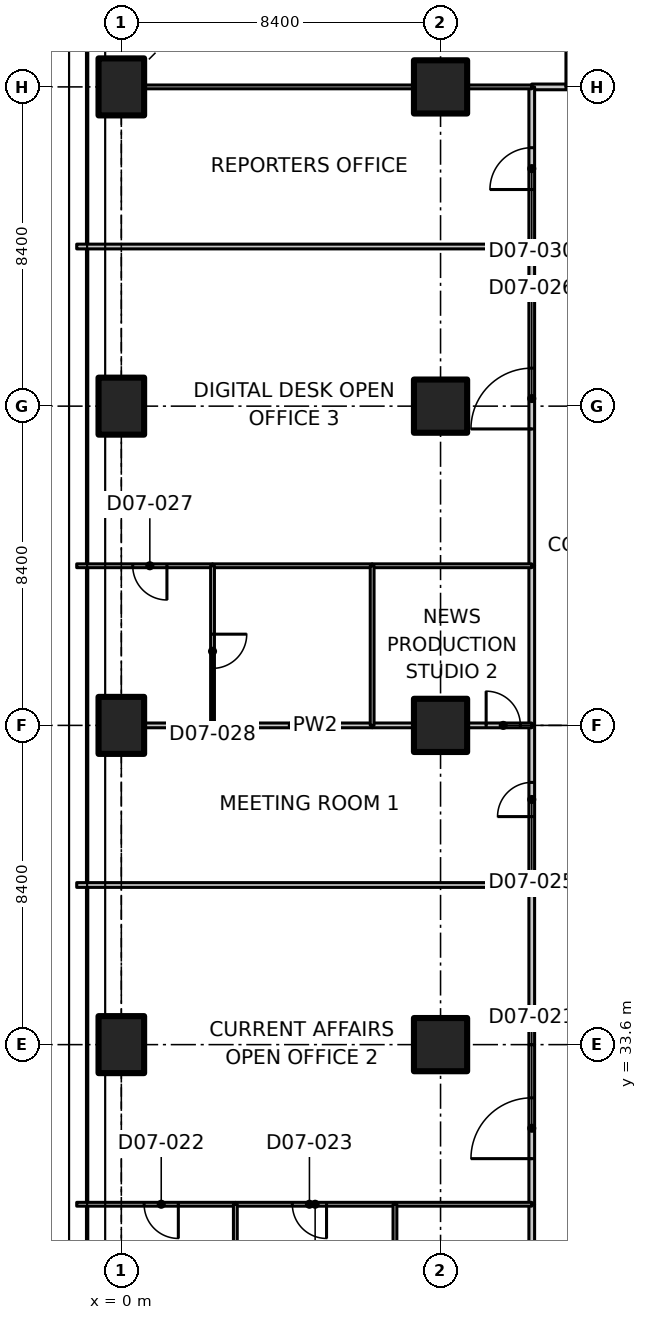
"""IFC4 building model, lengths in metres.
Left out: names, types, materials, properties, quantities, classifications, styles, units other than length and angle.
Written with IfcOpenShell. Run it as: python <this file> out.ifc"""

import sys

from ifc_helpers import new_model, si_unit, direction, frame, frame_2d, origin, origin_2d, place, context, subcontext, project, spatial, polyline, rectangle, outline, extrude, element, fill, save


model = new_model("IFC4")
c1 = context("Model", 3, precision=1e-05, world=origin(), true_north=direction((0.0, 1.0)))
c2 = subcontext(c1, "Body", "Model", "MODEL_VIEW")
j1 = project(units=[si_unit("LENGTHUNIT", "METRE"), si_unit("PLANEANGLEUNIT", "RADIAN")], contexts=[c1])
p1 = place(None, origin())
s1 = spatial("IfcSite", under=j1, at=p1, CompositionType="ELEMENT")
p2 = place(p1, origin())
s2 = spatial("IfcBuilding", under=s1, at=p2, CompositionType="ELEMENT")
p3 = place(p2, frame((0.0, 0.0, 43.7)))
s3 = spatial("IfcBuildingStorey", under=s2, at=p3, CompositionType="ELEMENT", Elevation=43.7)
for number, where, z_axis, x_axis in (
    (1, (0.0, 33.6, 0.0), (0.0, 0.0, 1.0), (1.0, 0.0, 0.0)),
    (2, (0.0, 42.0, 0.0), (0.0, 0.0, 1.0), (1.0, 0.0, 0.0)),
    (3, (0.0, 50.4, 0.0), (0.0, 0.0, 1.0), (1.0, 0.0, 0.0)),
    (4, (0.0, 58.8, 0.0), (0.0, 0.0, 1.0), (1.0, 0.0, 0.0)),
):
    element("IfcColumn", number, at=place(p3, frame(where, z_axis=z_axis, x_axis=x_axis)), inside=s3, PredefinedType="COLUMN", context=c2, shape_type="SweptSolid", body=[
        extrude(rectangle(XDim=1.2, YDim=1.5, at=origin_2d()), origin(), (0.0, 0.0, 1.0), 3.35),
    ])
for number, where, z_axis, x_axis in (
    (5, (8.4, 33.6, 0.0), (0.0, 0.0, 1.0), (1.0, 0.0, 0.0)),
    (6, (8.4, 42.0, 0.0), (0.0, 0.0, 1.0), (1.0, 0.0, 0.0)),
    (7, (8.4, 50.4, 0.0), (0.0, 0.0, 1.0), (1.0, 0.0, 0.0)),
    (8, (8.4, 58.8, 0.0), (0.0, 0.0, 1.0), (1.0, 0.0, 0.0)),
):
    element("IfcColumn", number, at=place(p3, frame(where, z_axis=z_axis, x_axis=x_axis)), inside=s3, PredefinedType="COLUMN", context=c2, shape_type="SweptSolid", body=[
        extrude(rectangle(XDim=1.4, YDim=1.4, at=origin_2d()), origin(), (0.0, 0.0, 1.0), 3.35),
    ])
p4 = place(p3, frame((10.8, 29.4, 0.0), z_axis=(0.0, 0.0, 1.0), x_axis=(0.0, 1.0, 0.0)))
e9 = element("IfcWall", 9, at=p4, inside=s3, PredefinedType="PARTITIONING", context=c2, shape_type="SweptSolid", body=[
    extrude(rectangle(XDim=4.2, YDim=0.15, at=frame_2d((2.1, 0.0))), origin(), (0.0, 0.0, 1.0), 3.33),
])
p5 = place(p4, frame((1.2, 0.0, 0.0)))
e10 = element("IfcOpeningElement", 10, at=p5, cuts=e9, PredefinedType="OPENING", context=c2, shape_type="SweptSolid", body=[
    extrude(rectangle(XDim=1.6, YDim=2.1, at=frame_2d((0.8, 1.05))), frame((0.0, 0.085, 0.0), z_axis=(0.0, -1.0, 0.0), x_axis=(1.0, 0.0, 0.0)), (0.0, 0.0, 1.0), 0.17),
])
p6 = place(p3, frame((10.8, 25.2, 0.0), z_axis=(0.0, 0.0, 1.0), x_axis=(0.0, 1.0, 0.0)))
e11 = element("IfcWall", 11, at=p6, inside=s3, PredefinedType="PARTITIONING", context=c2, shape_type="SweptSolid", body=[
    extrude(rectangle(XDim=4.2, YDim=0.15, at=frame_2d((2.1, 0.0))), origin(), (0.0, 0.0, 1.0), 3.33),
])
p7 = place(p3, frame((10.8, 58.8, 0.0), z_axis=(0.0, 0.0, 1.0), x_axis=(1.0, 0.0, 0.0)))
e12 = element("IfcWall", 12, at=p7, inside=s3, PredefinedType="PARTITIONING", context=c2, shape_type="SweptSolid", body=[
    extrude(rectangle(XDim=3.6, YDim=0.15, at=frame_2d((1.8, 0.0))), origin(), (0.0, 0.0, 1.0), 3.33),
])
p8 = place(p7, frame((0.9, 0.0, 0.0)))
e13 = element("IfcOpeningElement", 13, at=p8, cuts=e12, PredefinedType="OPENING", context=c2, shape_type="SweptSolid", body=[
    extrude(rectangle(XDim=2.0, YDim=2.4, at=frame_2d((1.0, 1.2))), frame((0.0, 0.085, 0.0), z_axis=(0.0, -1.0, 0.0), x_axis=(1.0, 0.0, 0.0)), (0.0, 0.0, 1.0), 0.17),
])
p9 = place(p3, frame((10.8, 33.6, 0.0), z_axis=(0.0, 0.0, 1.0), x_axis=(0.0, 1.0, 0.0)))
e14 = element("IfcWall", 14, at=p9, inside=s3, PredefinedType="PARTITIONING", context=c2, shape_type="SweptSolid", body=[
    extrude(rectangle(XDim=4.2, YDim=0.15, at=frame_2d((2.1, 0.0))), origin(), (0.0, 0.0, 1.0), 3.33),
])
p10 = place(p3, frame((10.8, 37.8, 0.0), z_axis=(0.0, 0.0, 1.0), x_axis=(0.0, 1.0, 0.0)))
e15 = element("IfcWall", 15, at=p10, inside=s3, PredefinedType="PARTITIONING", context=c2, shape_type="SweptSolid", body=[
    extrude(rectangle(XDim=4.2, YDim=0.15, at=frame_2d((2.1, 0.0))), origin(), (0.0, 0.0, 1.0), 3.33),
])
p11 = place(p10, frame((1.8, 0.0, 0.0)))
e16 = element("IfcOpeningElement", 16, at=p11, cuts=e15, PredefinedType="OPENING", context=c2, shape_type="SweptSolid", body=[
    extrude(rectangle(XDim=0.9, YDim=2.1, at=frame_2d((0.45, 1.05))), frame((0.0, 0.085, 0.0), z_axis=(0.0, -1.0, 0.0), x_axis=(1.0, 0.0, 0.0)), (0.0, 0.0, 1.0), 0.17),
])
p12 = place(p3, frame((10.8, 46.2, 0.0), z_axis=(0.0, 0.0, 1.0), x_axis=(0.0, 1.0, 0.0)))
e17 = element("IfcWall", 17, at=p12, inside=s3, PredefinedType="PARTITIONING", context=c2, shape_type="SweptSolid", body=[
    extrude(rectangle(XDim=8.4, YDim=0.15, at=frame_2d((4.2, 0.0))), origin(), (0.0, 0.0, 1.0), 3.33),
])
p13 = place(p12, frame((3.6, 0.0, 0.0)))
e18 = element("IfcOpeningElement", 18, at=p13, cuts=e17, PredefinedType="OPENING", context=c2, shape_type="SweptSolid", body=[
    extrude(rectangle(XDim=1.6, YDim=2.1, at=frame_2d((0.8, 1.05))), frame((0.0, 0.085, 0.0), z_axis=(0.0, -1.0, 0.0), x_axis=(1.0, 0.0, 0.0)), (0.0, 0.0, 1.0), 0.17),
])
p14 = place(p3, frame((10.8, 42.0, 0.0), z_axis=(0.0, 0.0, 1.0), x_axis=(0.0, 1.0, 0.0)))
e19 = element("IfcWall", 19, at=p14, inside=s3, PredefinedType="PARTITIONING", context=c2, shape_type="SweptSolid", body=[
    extrude(rectangle(XDim=4.2, YDim=0.15, at=frame_2d((2.1, 0.0))), origin(), (0.0, 0.0, 1.0), 3.33),
])
p15 = place(p3, frame((10.8, 54.6, 0.0), z_axis=(0.0, 0.0, 1.0), x_axis=(0.0, 1.0, 0.0)))
e20 = element("IfcWall", 20, at=p15, inside=s3, PredefinedType="PARTITIONING", context=c2, shape_type="SweptSolid", body=[
    extrude(rectangle(XDim=4.2, YDim=0.15, at=frame_2d((2.1, 0.0))), origin(), (0.0, 0.0, 1.0), 3.33),
])
p16 = place(p15, frame((1.5, 0.0, 0.0)))
e21 = element("IfcOpeningElement", 21, at=p16, cuts=e20, PredefinedType="OPENING", context=c2, shape_type="SweptSolid", body=[
    extrude(rectangle(XDim=1.1, YDim=2.1, at=frame_2d((0.55, 1.05))), frame((0.0, 0.085, 0.0), z_axis=(0.0, -1.0, 0.0), x_axis=(1.0, 0.0, 0.0)), (0.0, 0.0, 1.0), 0.17),
])
p17 = place(p3, frame((10.8, 58.8, 0.0), z_axis=(0.0, 0.0, 1.0), x_axis=(-1.0, 0.0, 0.0)))
e22 = element("IfcWall", 22, at=p17, inside=s3, PredefinedType="PARTITIONING", context=c2, shape_type="SweptSolid", body=[
    extrude(rectangle(XDim=1.68, YDim=0.1, at=frame_2d((0.84, 0.0))), origin(), (0.0, 0.0, 1.0), 3.33),
])
p18 = place(p3, frame((7.68, 58.8, 0.0), z_axis=(0.0, 0.0, 1.0), x_axis=(-1.0, 0.0, 0.0)))
e23 = element("IfcWall", 23, at=p18, inside=s3, PredefinedType="PARTITIONING", context=c2, shape_type="SweptSolid", body=[
    extrude(rectangle(XDim=7.06, YDim=0.1, at=frame_2d((3.53, 0.0))), origin(), (0.0, 0.0, 1.0), 3.33),
])
p19 = place(p3, frame((3.0, 29.4, 0.0), z_axis=(0.0, 0.0, 1.0), x_axis=(-1.0, 0.0, 0.0)))
e24 = element("IfcWall", 24, at=p19, inside=s3, PredefinedType="PARTITIONING", context=c2, shape_type="SweptSolid", body=[
    extrude(rectangle(XDim=4.174, YDim=0.1, at=frame_2d((2.087, 0.0))), origin(), (0.0, 0.0, 1.0), 2.98),
])
p20 = place(p19, frame((1.5, 0.0, 0.0)))
e25 = element("IfcOpeningElement", 25, at=p20, cuts=e24, PredefinedType="OPENING", context=c2, shape_type="SweptSolid", body=[
    extrude(rectangle(XDim=0.9, YDim=2.1, at=frame_2d((0.45, 1.05))), frame((0.0, 0.06, 0.0), z_axis=(0.0, -1.0, 0.0), x_axis=(1.0, 0.0, 0.0)), (0.0, 0.0, 1.0), 0.12),
])
p21 = place(p3, frame((7.2, 29.4, 0.0), z_axis=(0.0, 0.0, 1.0), x_axis=(-1.0, 0.0, 0.0)))
e26 = element("IfcWall", 26, at=p21, inside=s3, PredefinedType="PARTITIONING", context=c2, shape_type="SweptSolid", body=[
    extrude(rectangle(XDim=4.2, YDim=0.1, at=frame_2d((2.1, 0.0))), origin(), (0.0, 0.0, 1.0), 3.33),
])
p22 = place(p21, frame((1.8, 0.0, 0.0)))
e27 = element("IfcOpeningElement", 27, at=p22, cuts=e26, PredefinedType="OPENING", context=c2, shape_type="SweptSolid", body=[
    extrude(rectangle(XDim=0.9, YDim=2.1, at=frame_2d((0.45, 1.05))), frame((0.0, 0.06, 0.0), z_axis=(0.0, -1.0, 0.0), x_axis=(1.0, 0.0, 0.0)), (0.0, 0.0, 1.0), 0.12),
])
p23 = place(p3, frame((10.8, 29.4, 0.0), z_axis=(0.0, 0.0, 1.0), x_axis=(-1.0, 0.0, 0.0)))
e28 = element("IfcWall", 28, at=p23, inside=s3, PredefinedType="PARTITIONING", context=c2, shape_type="SweptSolid", body=[
    extrude(rectangle(XDim=3.6, YDim=0.1, at=frame_2d((1.8, 0.0))), origin(), (0.0, 0.0, 1.0), 3.33),
])
p24 = place(p3, frame((-1.174, 37.8, 0.0), z_axis=(0.0, 0.0, 1.0), x_axis=(1.0, 0.0, 0.0)))
e29 = element("IfcWall", 29, at=p24, inside=s3, PredefinedType="PARTITIONING", context=c2, shape_type="SweptSolid", body=[
    extrude(outline(polyline([(0.0, 0.0), (11.974, 0.0), (11.974, 3.33), (1.624, 3.33), (1.622, 2.98), (0.726, 2.98), (0.724, 3.33), (0.074, 3.33), (0.0, 3.33), (0.0, 0.0)])), frame((0.0, 0.062, 0.0), z_axis=(0.0, -1.0, 0.0), x_axis=(1.0, 0.0, 0.0)), (0.0, 0.0, 1.0), 0.125),
])
p25 = place(p3, frame((3.0, 29.4, 0.0), z_axis=(0.0, 0.0, 1.0), x_axis=(0.0, -1.0, 0.0)))
e30 = element("IfcWall", 30, at=p25, inside=s3, PredefinedType="PARTITIONING", context=c2, shape_type="SweptSolid", body=[
    extrude(rectangle(XDim=4.2, YDim=0.1, at=frame_2d((2.1, 0.0))), origin(), (0.0, 0.0, 1.0), 3.33),
])
p26 = place(p3, frame((7.2, 29.4, 0.0), z_axis=(0.0, 0.0, 1.0), x_axis=(0.0, -1.0, 0.0)))
e31 = element("IfcWall", 31, at=p26, inside=s3, PredefinedType="PARTITIONING", context=c2, shape_type="SweptSolid", body=[
    extrude(rectangle(XDim=4.2, YDim=0.1, at=frame_2d((2.1, 0.0))), origin(), (0.0, 0.0, 1.0), 3.33),
])
p27 = place(p26, frame((1.5, 0.0, 0.0)))
e32 = element("IfcOpeningElement", 32, at=p27, cuts=e31, PredefinedType="OPENING", context=c2, shape_type="SweptSolid", body=[
    extrude(rectangle(XDim=0.9, YDim=2.1, at=frame_2d((0.45, 1.05))), frame((0.0, 0.06, 0.0), z_axis=(0.0, -1.0, 0.0), x_axis=(1.0, 0.0, 0.0)), (0.0, 0.0, 1.0), 0.12),
])
p28 = place(p3, frame((0.62, 42.0, 0.0), z_axis=(0.0, 0.0, 1.0), x_axis=(1.0, 0.0, 0.0)))
e33 = element("IfcWall", 33, at=p28, inside=s3, PredefinedType="PARTITIONING", context=c2, shape_type="SweptSolid", body=[
    extrude(rectangle(XDim=1.78, YDim=0.125, at=frame_2d((0.89, 0.0))), origin(), (0.0, 0.0, 1.0), 3.33),
])
p29 = place(p3, frame((2.4, 42.0, 0.0), z_axis=(0.0, 0.0, 1.0), x_axis=(1.0, 0.0, 0.0)))
e34 = element("IfcWall", 34, at=p29, inside=s3, PredefinedType="PARTITIONING", context=c2, shape_type="SweptSolid", body=[
    extrude(rectangle(XDim=4.2, YDim=0.125, at=frame_2d((2.1, 0.0))), origin(), (0.0, 0.0, 1.0), 3.33),
])
p30 = place(p3, frame((6.6, 42.0, 0.0), z_axis=(0.0, 0.0, 1.0), x_axis=(1.0, 0.0, 0.0)))
e35 = element("IfcWall", 35, at=p30, inside=s3, PredefinedType="PARTITIONING", context=c2, shape_type="SweptSolid", body=[
    extrude(rectangle(XDim=4.2, YDim=0.125, at=frame_2d((2.1, 0.0))), origin(), (0.0, 0.0, 1.0), 3.33),
])
p31 = place(p30, frame((3.0, 0.0, 0.0)))
e36 = element("IfcOpeningElement", 36, at=p31, cuts=e35, PredefinedType="OPENING", context=c2, shape_type="SweptSolid", body=[
    extrude(rectangle(XDim=0.9, YDim=2.1, at=frame_2d((0.45, 1.05))), frame((0.0, 0.073, 0.0), z_axis=(0.0, -1.0, 0.0), x_axis=(1.0, 0.0, 0.0)), (0.0, 0.0, 1.0), 0.145),
])
p32 = place(p3, frame((2.4, 46.2, 0.0), z_axis=(0.0, 0.0, 1.0), x_axis=(-1.0, 0.0, 0.0)))
e37 = element("IfcWall", 37, at=p32, inside=s3, PredefinedType="PARTITIONING", context=c2, shape_type="SweptSolid", body=[
    extrude(rectangle(XDim=3.574, YDim=0.1, at=frame_2d((1.787, 0.0))), origin(), (0.0, 0.0, 1.0), 2.98),
])
p33 = place(p32, frame((1.2, 0.0, 0.0)))
e38 = element("IfcOpeningElement", 38, at=p33, cuts=e37, PredefinedType="OPENING", context=c2, shape_type="SweptSolid", body=[
    extrude(rectangle(XDim=0.9, YDim=2.1, at=frame_2d((0.45, 1.05))), frame((0.0, 0.06, 0.0), z_axis=(0.0, -1.0, 0.0), x_axis=(1.0, 0.0, 0.0)), (0.0, 0.0, 1.0), 0.12),
])
p34 = place(p3, frame((6.6, 46.2, 0.0), z_axis=(0.0, 0.0, 1.0), x_axis=(-1.0, 0.0, 0.0)))
e39 = element("IfcWall", 39, at=p34, inside=s3, PredefinedType="PARTITIONING", context=c2, shape_type="SweptSolid", body=[
    extrude(rectangle(XDim=4.2, YDim=0.1, at=frame_2d((2.1, 0.0))), origin(), (0.0, 0.0, 1.0), 3.33),
])
p35 = place(p3, frame((10.8, 46.2, 0.0), z_axis=(0.0, 0.0, 1.0), x_axis=(-1.0, 0.0, 0.0)))
e40 = element("IfcWall", 40, at=p35, inside=s3, PredefinedType="PARTITIONING", context=c2, shape_type="SweptSolid", body=[
    extrude(rectangle(XDim=4.2, YDim=0.1, at=frame_2d((2.1, 0.0))), origin(), (0.0, 0.0, 1.0), 3.33),
])
p36 = place(p3, frame((-1.174, 54.6, 0.0), z_axis=(0.0, 0.0, 1.0), x_axis=(1.0, 0.0, 0.0)))
e41 = element("IfcWall", 41, at=p36, inside=s3, PredefinedType="PARTITIONING", context=c2, shape_type="SweptSolid", body=[
    extrude(outline(polyline([(0.0, 0.0), (11.974, 0.0), (11.974, 3.33), (1.624, 3.33), (1.622, 2.98), (0.726, 2.98), (0.724, 3.33), (0.074, 3.33), (0.0, 3.33), (0.0, 0.0)])), frame((0.0, 0.062, 0.0), z_axis=(0.0, -1.0, 0.0), x_axis=(1.0, 0.0, 0.0)), (0.0, 0.0, 1.0), 0.125),
])
p37 = place(p3, frame((2.4, 46.2, 0.0), z_axis=(0.0, 0.0, 1.0), x_axis=(0.0, -1.0, 0.0)))
e42 = element("IfcWall", 42, at=p37, inside=s3, PredefinedType="PARTITIONING", context=c2, shape_type="SweptSolid", body=[
    extrude(rectangle(XDim=4.2, YDim=0.1, at=frame_2d((2.1, 0.0))), origin(), (0.0, 0.0, 1.0), 3.33),
])
p38 = place(p37, frame((1.8, 0.0, 0.0)))
e43 = element("IfcOpeningElement", 43, at=p38, cuts=e42, PredefinedType="OPENING", context=c2, shape_type="SweptSolid", body=[
    extrude(rectangle(XDim=0.9, YDim=2.1, at=frame_2d((0.45, 1.05))), frame((0.0, 0.06, 0.0), z_axis=(0.0, -1.0, 0.0), x_axis=(1.0, 0.0, 0.0)), (0.0, 0.0, 1.0), 0.12),
])
p39 = place(p3, frame((6.6, 46.2, 0.0), z_axis=(0.0, 0.0, 1.0), x_axis=(0.0, -1.0, 0.0)))
e44 = element("IfcWall", 44, at=p39, inside=s3, PredefinedType="PARTITIONING", context=c2, shape_type="SweptSolid", body=[
    extrude(rectangle(XDim=4.2, YDim=0.1, at=frame_2d((2.1, 0.0))), origin(), (0.0, 0.0, 1.0), 3.33),
])
p40 = place(p8, origin())
e45 = element("IfcDoor", 45, at=p40, inside=s3, OperationType="DOUBLE_DOOR_SINGLE_SWING", PredefinedType="DOOR", context=c2, shape_type="SweptSolid", body=[
    extrude(rectangle(XDim=2.0, YDim=2.4, at=frame_2d((1.0, 1.2))), frame((0.0, 0.025, 0.0), z_axis=(0.0, -1.0, 0.0), x_axis=(1.0, 0.0, 0.0)), (0.0, 0.0, 1.0), 0.05),
])
fill(e13, e45)
p41 = place(p5, origin())
e46 = element("IfcDoor", 46, at=p41, inside=s3, OperationType="DOUBLE_DOOR_SINGLE_SWING", PredefinedType="DOOR", context=c2, shape_type="SweptSolid", body=[
    extrude(rectangle(XDim=1.6, YDim=2.1, at=frame_2d((0.8, 1.05))), frame((0.0, 0.025, 0.0), z_axis=(0.0, -1.0, 0.0), x_axis=(1.0, 0.0, 0.0)), (0.0, 0.0, 1.0), 0.05),
])
fill(e10, e46)
p42 = place(p20, origin())
e47 = element("IfcDoor", 47, at=p42, inside=s3, OperationType="SINGLE_SWING_LEFT", PredefinedType="DOOR", context=c2, shape_type="SweptSolid", body=[
    extrude(rectangle(XDim=0.9, YDim=2.1, at=frame_2d((0.45, 1.05))), frame((0.0, 0.025, 0.0), z_axis=(0.0, -1.0, 0.0), x_axis=(1.0, 0.0, 0.0)), (0.0, 0.0, 1.0), 0.05),
])
fill(e25, e47)
p43 = place(p22, origin())
e48 = element("IfcDoor", 48, at=p43, inside=s3, OperationType="SINGLE_SWING_LEFT", PredefinedType="DOOR", context=c2, shape_type="SweptSolid", body=[
    extrude(rectangle(XDim=0.9, YDim=2.1, at=frame_2d((0.45, 1.05))), frame((0.0, 0.025, 0.0), z_axis=(0.0, -1.0, 0.0), x_axis=(1.0, 0.0, 0.0)), (0.0, 0.0, 1.0), 0.05),
])
fill(e27, e48)
p44 = place(p11, origin())
e49 = element("IfcDoor", 49, at=p44, inside=s3, OperationType="SINGLE_SWING_LEFT", PredefinedType="DOOR", context=c2, shape_type="SweptSolid", body=[
    extrude(rectangle(XDim=0.9, YDim=2.1, at=frame_2d((0.45, 1.05))), frame((0.0, 0.025, 0.0), z_axis=(0.0, -1.0, 0.0), x_axis=(1.0, 0.0, 0.0)), (0.0, 0.0, 1.0), 0.05),
])
fill(e16, e49)
p45 = place(p13, origin())
e50 = element("IfcDoor", 50, at=p45, inside=s3, OperationType="DOUBLE_DOOR_SINGLE_SWING", PredefinedType="DOOR", context=c2, shape_type="SweptSolid", body=[
    extrude(rectangle(XDim=1.6, YDim=2.1, at=frame_2d((0.8, 1.05))), frame((0.0, 0.025, 0.0), z_axis=(0.0, -1.0, 0.0), x_axis=(1.0, 0.0, 0.0)), (0.0, 0.0, 1.0), 0.05),
])
fill(e18, e50)
p46 = place(p33, origin())
e51 = element("IfcDoor", 51, at=p46, inside=s3, OperationType="SINGLE_SWING_LEFT", PredefinedType="DOOR", context=c2, shape_type="SweptSolid", body=[
    extrude(rectangle(XDim=0.9, YDim=2.1, at=frame_2d((0.45, 1.05))), frame((0.0, 0.025, 0.0), z_axis=(0.0, -1.0, 0.0), x_axis=(1.0, 0.0, 0.0)), (0.0, 0.0, 1.0), 0.05),
])
fill(e38, e51)
p47 = place(p38, origin())
e52 = element("IfcDoor", 52, at=p47, inside=s3, OperationType="SINGLE_SWING_LEFT", PredefinedType="DOOR", context=c2, shape_type="SweptSolid", body=[
    extrude(rectangle(XDim=0.9, YDim=2.1, at=frame_2d((0.45, 1.05))), frame((0.0, 0.025, 0.0), z_axis=(0.0, -1.0, 0.0), x_axis=(1.0, 0.0, 0.0)), (0.0, 0.0, 1.0), 0.05),
])
fill(e43, e52)
p48 = place(p31, origin())
e53 = element("IfcDoor", 53, at=p48, inside=s3, OperationType="SINGLE_SWING_RIGHT", PredefinedType="DOOR", context=c2, shape_type="SweptSolid", body=[
    extrude(rectangle(XDim=0.9, YDim=2.1, at=frame_2d((0.45, 1.05))), frame((0.0, 0.025, 0.0), z_axis=(0.0, -1.0, 0.0), x_axis=(1.0, 0.0, 0.0)), (0.0, 0.0, 1.0), 0.05),
])
fill(e36, e53)
p49 = place(p16, origin())
e54 = element("IfcDoor", 54, at=p49, inside=s3, OperationType="SINGLE_SWING_LEFT", PredefinedType="DOOR", context=c2, shape_type="SweptSolid", body=[
    extrude(rectangle(XDim=1.1, YDim=2.1, at=frame_2d((0.55, 1.05))), frame((0.0, 0.025, 0.0), z_axis=(0.0, -1.0, 0.0), x_axis=(1.0, 0.0, 0.0)), (0.0, 0.0, 1.0), 0.05),
])
fill(e21, e54)
save(model, sys.argv[1])
